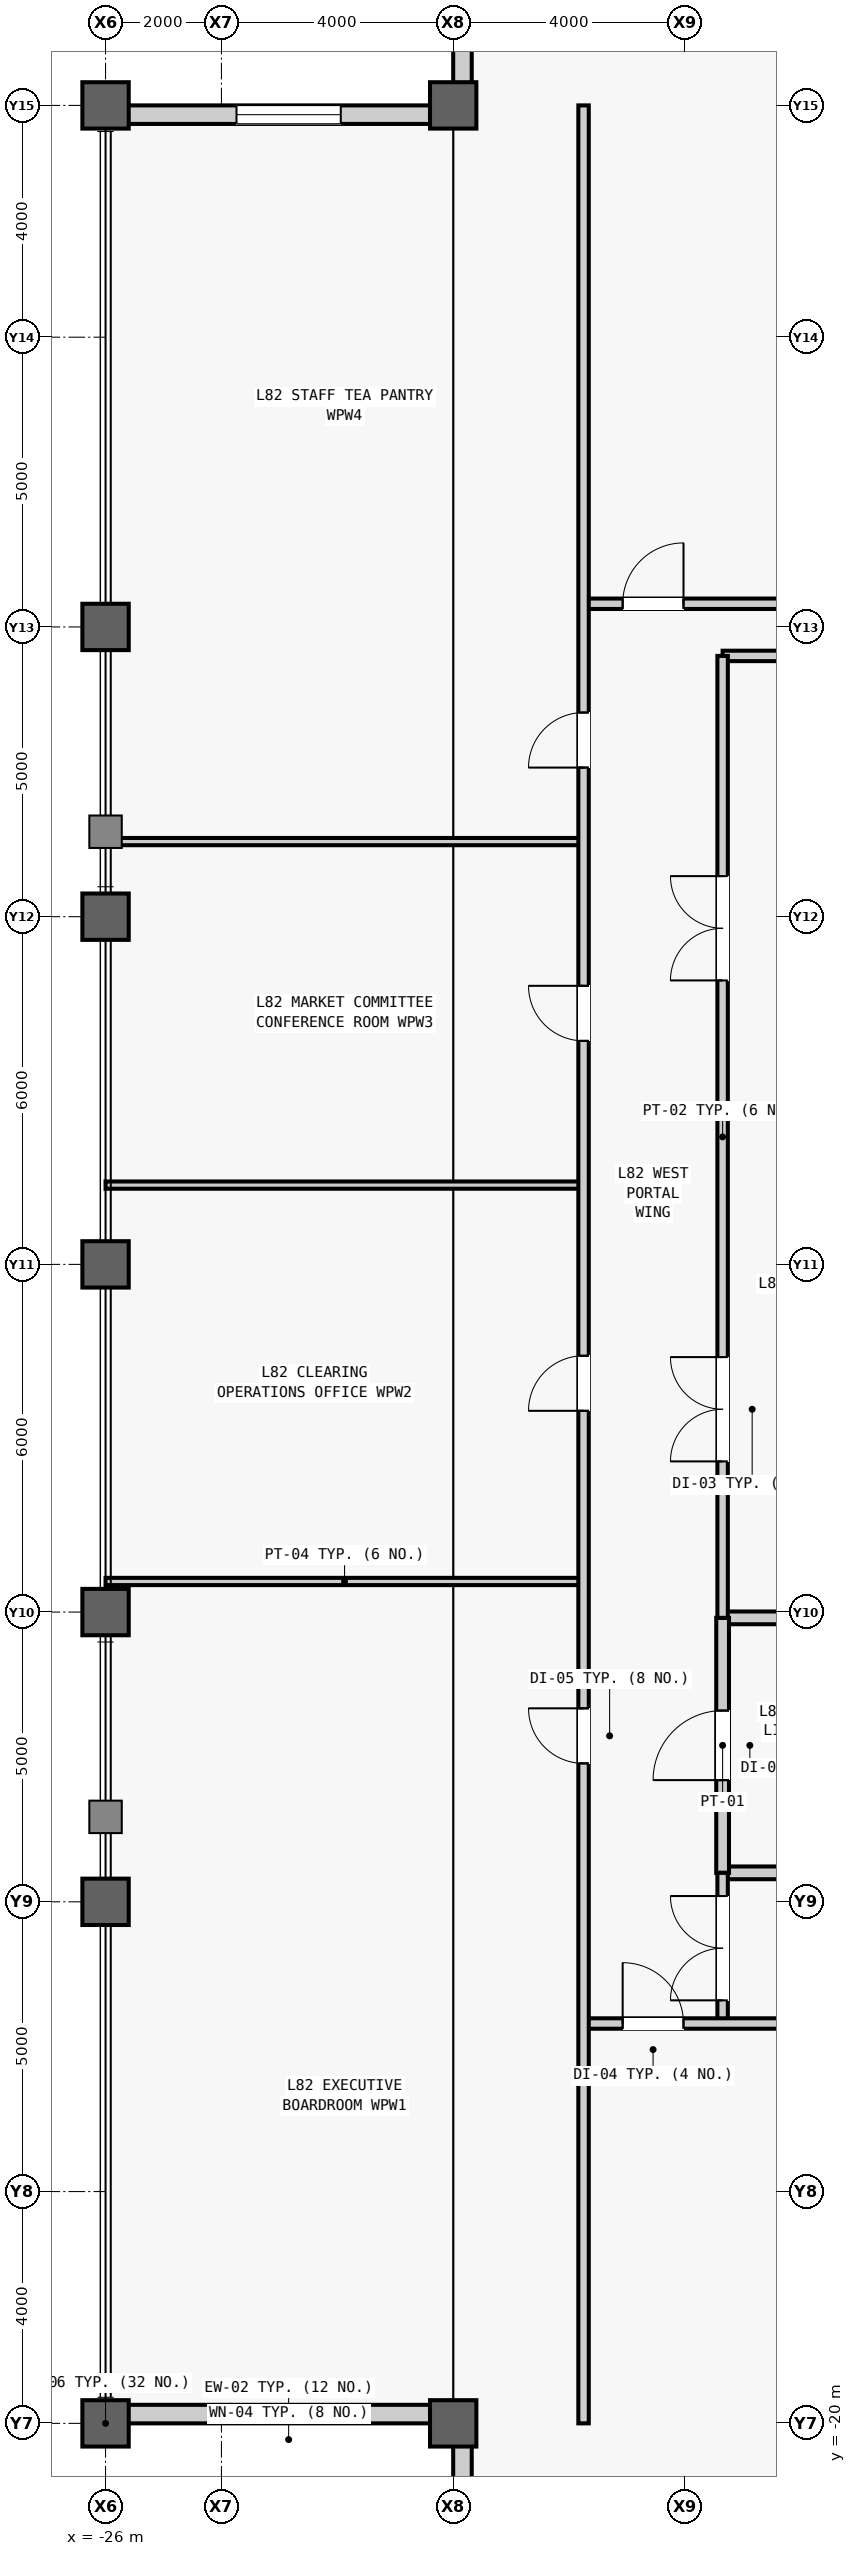
"""IFC4 building model, lengths in metres.
Left out: names, types, materials, properties, quantities, classifications, styles, units other than length and angle.
Written with IfcOpenShell. Run it as: python <this file> out.ifc"""

import sys

from ifc_helpers import new_model, si_unit, direction, frame, frame_2d, origin, origin_2d, place, context, subcontext, project, spatial, rectangle, hollow_rectangle, extrude, source, transform, mapped, element, fill, save


model = new_model("IFC4")
c1 = context("Model", 3, precision=1e-05, world=origin(), true_north=direction((0.0, 1.0)))
c2 = subcontext(c1, "Body", "Model", "MODEL_VIEW")
j1 = project(units=[si_unit("LENGTHUNIT", "METRE"), si_unit("PLANEANGLEUNIT", "RADIAN")], contexts=[c1])
p1 = place(None, origin())
s1 = spatial("IfcSite", under=j1, at=p1, CompositionType="ELEMENT")
p2 = place(p1, origin())
s2 = spatial("IfcBuilding", under=s1, at=p2, CompositionType="ELEMENT")
p3 = place(p2, frame((0.0, 0.0, 346.3)))
s3 = spatial("IfcBuildingStorey", under=s2, at=p3, CompositionType="ELEMENT", Elevation=346.3)
m1 = source(origin(), c2, "Body", "SweptSolid", [
    extrude(hollow_rectangle(XDim=0.8, YDim=0.8, WallThickness=0.045, at=origin_2d()), origin(), (0.0, 0.0, 1.0), 4.0),
])
for number, where, z_axis, x_axis in (
    (1, (-26.0, -20.0, 0.0), (0.0, 0.0, 1.0), (1.0, 0.0, 0.0)),
    (2, (-26.0, -11.0, 0.0), (0.0, 0.0, 1.0), (1.0, 0.0, 0.0)),
    (3, (-26.0, -6.0, 0.0), (0.0, 0.0, 1.0), (1.0, 0.0, 0.0)),
    (4, (-26.0, 0.0, 0.0), (0.0, 0.0, 1.0), (1.0, 0.0, 0.0)),
    (5, (-26.0, 6.0, 0.0), (0.0, 0.0, 1.0), (1.0, 0.0, 0.0)),
    (6, (-26.0, 11.0, 0.0), (0.0, 0.0, 1.0), (1.0, 0.0, 0.0)),
    (7, (-26.0, 20.0, 0.0), (0.0, 0.0, 1.0), (1.0, 0.0, 0.0)),
    (8, (-20.0, -20.0, 0.0), (0.0, 0.0, 1.0), (1.0, 0.0, 0.0)),
    (9, (-20.0, 20.0, 0.0), (0.0, 0.0, 1.0), (1.0, 0.0, 0.0)),
):
    element("IfcColumn", number, at=place(p3, frame(where, z_axis=z_axis, x_axis=x_axis)), inside=s3, PredefinedType="COLUMN", context=c2, shape_type="MappedRepresentation", body=[
        mapped(m1, transform((0.0, 0.0, 0.0), scale=1.0)),
    ])
m2 = source(origin(), c2, "Body", "SweptSolid", [
    extrude(rectangle(XDim=5.68, YDim=0.32, at=frame_2d((2.84, 0.0))), origin(), (0.0, 0.0, 1.0), 3.191),
])
p4 = place(p3, frame((-20.0, -19.84, 0.0), z_axis=(0.0, 0.0, 1.0), x_axis=(-1.0, 0.0, 0.0)))
e10 = element("IfcWall", 10, at=p4, inside=s3, PredefinedType="STANDARD", context=c2, shape_type="MappedRepresentation", body=[
    mapped(m2, transform((0.0, 0.0, 0.0), scale=1.0)),
])
m3 = source(origin(), c2, "Body", "SweptSolid", [
    extrude(rectangle(XDim=1.8, YDim=2.4, at=frame_2d((0.9, 1.2))), frame((0.0, 0.17, 0.0), z_axis=(0.0, -1.0, 0.0), x_axis=(1.0, 0.0, 0.0)), (0.0, 0.0, 1.0), 0.34),
])
p5 = place(p4, frame((1.94, 0.0, 0.5)))
e11 = element("IfcOpeningElement", 11, at=p5, cuts=e10, PredefinedType="OPENING", context=c2, shape_type="MappedRepresentation", body=[
    mapped(m3, transform((0.0, 0.0, 0.0), scale=1.0)),
])
p6 = place(p3, frame((-19.84, -25.68, 0.0), z_axis=(0.0, 0.0, 1.0), x_axis=(0.0, 1.0, 0.0)))
e12 = element("IfcWall", 12, at=p6, inside=s3, PredefinedType="STANDARD", context=c2, shape_type="MappedRepresentation", body=[
    mapped(m2, transform((0.0, 0.0, 0.0), scale=1.0)),
])
p7 = place(p6, frame((1.94, 0.0, 0.5)))
e13 = element("IfcOpeningElement", 13, at=p7, cuts=e12, PredefinedType="OPENING", context=c2, shape_type="MappedRepresentation", body=[
    mapped(m3, transform((0.0, 0.0, 0.0), scale=1.0)),
])
p8 = place(p3, frame((-19.84, 20.0, 0.0), z_axis=(0.0, 0.0, 1.0), x_axis=(0.0, 1.0, 0.0)))
e14 = element("IfcWall", 14, at=p8, inside=s3, PredefinedType="STANDARD", context=c2, shape_type="MappedRepresentation", body=[
    mapped(m2, transform((0.0, 0.0, 0.0), scale=1.0)),
])
p9 = place(p8, frame((1.94, 0.0, 0.5)))
e15 = element("IfcOpeningElement", 15, at=p9, cuts=e14, PredefinedType="OPENING", context=c2, shape_type="MappedRepresentation", body=[
    mapped(m3, transform((0.0, 0.0, 0.0), scale=1.0)),
])
p10 = place(p3, frame((-20.0, 19.84, 0.0), z_axis=(0.0, 0.0, 1.0), x_axis=(-1.0, 0.0, 0.0)))
e16 = element("IfcWall", 16, at=p10, inside=s3, PredefinedType="STANDARD", context=c2, shape_type="MappedRepresentation", body=[
    mapped(m2, transform((0.0, 0.0, 0.0), scale=1.0)),
])
p11 = place(p10, frame((1.94, 0.0, 0.5)))
e17 = element("IfcOpeningElement", 17, at=p11, cuts=e16, PredefinedType="OPENING", context=c2, shape_type="MappedRepresentation", body=[
    mapped(m3, transform((0.0, 0.0, 0.0), scale=1.0)),
])
m4 = source(origin(), c2, "Body", "SweptSolid", [
    extrude(rectangle(XDim=4.05, YDim=0.22, at=frame_2d((2.025, 0.0))), origin(), (0.0, 0.0, 1.0), 3.74),
])
p12 = place(p3, frame((-15.35, -10.5, 0.0), z_axis=(0.0, 0.0, 1.0), x_axis=(1.0, 0.0, 0.0)))
e18 = element("IfcWall", 18, at=p12, inside=s3, PredefinedType="PARTITIONING", context=c2, shape_type="MappedRepresentation", body=[
    mapped(m4, transform((0.0, 0.0, 0.0), scale=1.0)),
])
m5 = source(origin(), c2, "Body", "SweptSolid", [
    extrude(rectangle(XDim=4.05, YDim=0.22, at=frame_2d((2.025, 0.0))), origin(), (0.0, 0.0, 1.0), 3.124),
])
p13 = place(p3, frame((-15.35, -6.1, 0.0), z_axis=(0.0, 0.0, 1.0), x_axis=(1.0, 0.0, 0.0)))
e19 = element("IfcWall", 19, at=p13, inside=s3, PredefinedType="PARTITIONING", context=c2, shape_type="MappedRepresentation", body=[
    mapped(m5, transform((0.0, 0.0, 0.0), scale=1.0)),
])
m6 = source(origin(), c2, "Body", "SweptSolid", [
    extrude(rectangle(XDim=4.4, YDim=0.22, at=frame_2d((2.2, 0.0))), origin(), (0.0, 0.0, 1.0), 3.74),
])
p14 = place(p3, frame((-15.35, -10.5, 0.0), z_axis=(0.0, 0.0, 1.0), x_axis=(0.0, 1.0, 0.0)))
e20 = element("IfcWall", 20, at=p14, inside=s3, PredefinedType="PARTITIONING", context=c2, shape_type="MappedRepresentation", body=[
    mapped(m6, transform((0.0, 0.0, 0.0), scale=1.0)),
])
m7 = source(origin(), c2, "Body", "SweptSolid", [
    extrude(rectangle(XDim=1.2, YDim=2.2, at=frame_2d((0.6, 1.1))), frame((0.0, 0.12, 0.0), z_axis=(0.0, -1.0, 0.0), x_axis=(1.0, 0.0, 0.0)), (0.0, 0.0, 1.0), 0.24),
])
p15 = place(p14, frame((1.6, 0.0, 0.0)))
e21 = element("IfcOpeningElement", 21, at=p15, cuts=e20, PredefinedType="OPENING", context=c2, shape_type="MappedRepresentation", body=[
    mapped(m7, transform((0.0, 0.0, 0.0), scale=1.0)),
])
m8 = source(origin(), c2, "Body", "SweptSolid", [
    extrude(rectangle(XDim=4.05, YDim=0.18, at=frame_2d((2.025, 0.0))), origin(), (0.0, 0.0, 1.0), 3.74),
])
p16 = place(p3, frame((-15.35, 10.5, 0.0), z_axis=(0.0, 0.0, 1.0), x_axis=(1.0, 0.0, 0.0)))
e22 = element("IfcWall", 22, at=p16, inside=s3, PredefinedType="PARTITIONING", context=c2, shape_type="MappedRepresentation", body=[
    mapped(m8, transform((0.0, 0.0, 0.0), scale=1.0)),
])
m9 = source(origin(), c2, "Body", "SweptSolid", [
    extrude(rectangle(XDim=16.6, YDim=0.18, at=frame_2d((8.3, 0.0))), origin(), (0.0, 0.0, 1.0), 3.74),
])
p17 = place(p3, frame((-15.35, -6.1, 0.0), z_axis=(0.0, 0.0, 1.0), x_axis=(0.0, 1.0, 0.0)))
e23 = element("IfcWall", 23, at=p17, inside=s3, PredefinedType="PARTITIONING", context=c2, shape_type="MappedRepresentation", body=[
    mapped(m9, transform((0.0, 0.0, 0.0), scale=1.0)),
])
m10 = source(origin(), c2, "Body", "SweptSolid", [
    extrude(rectangle(XDim=1.8, YDim=2.25, at=frame_2d((0.9, 1.125))), frame((0.0, 0.1, 0.0), z_axis=(0.0, -1.0, 0.0), x_axis=(1.0, 0.0, 0.0)), (0.0, 0.0, 1.0), 0.2),
])
p18 = place(p17, frame((2.7, 0.0, 0.0)))
e24 = element("IfcOpeningElement", 24, at=p18, cuts=e23, PredefinedType="OPENING", context=c2, shape_type="MappedRepresentation", body=[
    mapped(m10, transform((0.0, 0.0, 0.0), scale=1.0)),
])
p19 = place(p17, frame((11.0, 0.0, 0.0)))
e25 = element("IfcOpeningElement", 25, at=p19, cuts=e23, PredefinedType="OPENING", context=c2, shape_type="MappedRepresentation", body=[
    mapped(m10, transform((0.0, 0.0, 0.0), scale=1.0)),
])
m11 = source(origin(), c2, "Body", "SweptSolid", [
    extrude(rectangle(XDim=2.6, YDim=0.18, at=frame_2d((1.3, 0.0))), origin(), (0.0, 0.0, 1.0), 3.74),
])
p20 = place(p3, frame((-15.35, -13.1, 0.0), z_axis=(0.0, 0.0, 1.0), x_axis=(0.0, 1.0, 0.0)))
e26 = element("IfcWall", 26, at=p20, inside=s3, PredefinedType="PARTITIONING", context=c2, shape_type="MappedRepresentation", body=[
    mapped(m11, transform((0.0, 0.0, 0.0), scale=1.0)),
])
p21 = place(p20, frame((0.4, 0.0, 0.0)))
e27 = element("IfcOpeningElement", 27, at=p21, cuts=e26, PredefinedType="OPENING", context=c2, shape_type="MappedRepresentation", body=[
    mapped(m10, transform((0.0, 0.0, 0.0), scale=1.0)),
])
m12 = source(origin(), c2, "Body", "SweptSolid", [
    extrude(rectangle(XDim=22.55, YDim=0.18, at=frame_2d((11.275, 0.0))), origin(), (0.0, 0.0, 1.0), 3.74),
])
p22 = place(p3, frame((-17.75, -13.1, 0.0), z_axis=(0.0, 0.0, 1.0), x_axis=(1.0, 0.0, 0.0)))
e28 = element("IfcWall", 28, at=p22, inside=s3, PredefinedType="PARTITIONING", context=c2, shape_type="MappedRepresentation", body=[
    mapped(m12, transform((0.0, 0.0, 0.0), scale=1.0)),
])
m13 = source(origin(), c2, "Body", "SweptSolid", [
    extrude(rectangle(XDim=1.05, YDim=2.2, at=frame_2d((0.525, 1.1))), frame((0.0, 0.1, 0.0), z_axis=(0.0, -1.0, 0.0), x_axis=(1.0, 0.0, 0.0)), (0.0, 0.0, 1.0), 0.2),
])
p23 = place(p22, frame((0.675, 0.0, 0.0)))
e29 = element("IfcOpeningElement", 29, at=p23, cuts=e28, PredefinedType="OPENING", context=c2, shape_type="MappedRepresentation", body=[
    mapped(m13, transform((0.0, 0.0, 0.0), scale=1.0)),
])
m14 = source(origin(), c2, "Body", "SweptSolid", [
    extrude(rectangle(XDim=12.7, YDim=0.18, at=frame_2d((6.35, 0.0))), origin(), (0.0, 0.0, 1.0), 2.79),
])
p24 = place(p3, frame((-17.75, 11.4, 0.0), z_axis=(0.0, 0.0, 1.0), x_axis=(1.0, 0.0, 0.0)))
e30 = element("IfcWall", 30, at=p24, inside=s3, PredefinedType="PARTITIONING", context=c2, shape_type="MappedRepresentation", body=[
    mapped(m14, transform((0.0, 0.0, 0.0), scale=1.0)),
])
p25 = place(p24, frame((0.675, 0.0, 0.0)))
e31 = element("IfcOpeningElement", 31, at=p25, cuts=e30, PredefinedType="OPENING", context=c2, shape_type="MappedRepresentation", body=[
    mapped(m13, transform((0.0, 0.0, 0.0), scale=1.0)),
])
m15 = source(origin(), c2, "Body", "SweptSolid", [
    extrude(rectangle(XDim=8.25, YDim=0.125, at=frame_2d((4.125, 0.0))), origin(), (0.0, 0.0, 1.0), 3.74),
])
for number, where, z_axis, x_axis in (
    (32, (-26.0, -5.472, 0.0), (0.0, 0.0, 1.0), (1.0, 0.0, 0.0)),
    (33, (-26.0, 1.368, 0.0), (0.0, 0.0, 1.0), (1.0, 0.0, 0.0)),
    (34, (-26.0, 7.296, 0.0), (0.0, 0.0, 1.0), (1.0, 0.0, 0.0)),
):
    element("IfcWall", number, at=place(p3, frame(where, z_axis=z_axis, x_axis=x_axis)), inside=s3, PredefinedType="PARTITIONING", context=c2, shape_type="MappedRepresentation", body=[
        mapped(m15, transform((0.0, 0.0, 0.0), scale=1.0)),
    ])
m16 = source(origin(), c2, "Body", "SweptSolid", [
    extrude(rectangle(XDim=40.0, YDim=0.18, at=frame_2d((20.0, 0.0))), origin(), (0.0, 0.0, 1.0), 3.74),
])
p26 = place(p3, frame((-17.75, -20.0, 0.0), z_axis=(0.0, 0.0, 1.0), x_axis=(0.0, 1.0, 0.0)))
e35 = element("IfcWall", 35, at=p26, inside=s3, PredefinedType="PARTITIONING", context=c2, shape_type="MappedRepresentation", body=[
    mapped(m16, transform((0.0, 0.0, 0.0), scale=1.0)),
])
m17 = source(origin(), c2, "Body", "SweptSolid", [
    extrude(rectangle(XDim=0.95, YDim=2.15, at=frame_2d((0.475, 1.075))), frame((0.0, 0.1, 0.0), z_axis=(0.0, -1.0, 0.0), x_axis=(1.0, 0.0, 0.0)), (0.0, 0.0, 1.0), 0.2),
])
p27 = place(p26, frame((11.389, 0.0, 0.0)))
e36 = element("IfcOpeningElement", 36, at=p27, cuts=e35, PredefinedType="OPENING", context=c2, shape_type="MappedRepresentation", body=[
    mapped(m17, transform((0.0, 0.0, 0.0), scale=1.0)),
])
p28 = place(p26, frame((17.473, 0.0, 0.0)))
e37 = element("IfcOpeningElement", 37, at=p28, cuts=e35, PredefinedType="OPENING", context=c2, shape_type="MappedRepresentation", body=[
    mapped(m17, transform((0.0, 0.0, 0.0), scale=1.0)),
])
p29 = place(p26, frame((23.857, 0.0, 0.0)))
e38 = element("IfcOpeningElement", 38, at=p29, cuts=e35, PredefinedType="OPENING", context=c2, shape_type="MappedRepresentation", body=[
    mapped(m17, transform((0.0, 0.0, 0.0), scale=1.0)),
])
p30 = place(p26, frame((28.573, 0.0, 0.0)))
e39 = element("IfcOpeningElement", 39, at=p30, cuts=e35, PredefinedType="OPENING", context=c2, shape_type="MappedRepresentation", body=[
    mapped(m17, transform((0.0, 0.0, 0.0), scale=1.0)),
])
m18 = source(origin(), c2, "Body", "SweptSolid", [
    extrude(rectangle(XDim=1.8, YDim=2.4, at=frame_2d((0.9, 1.2))), frame((0.0, 0.03, 0.0), z_axis=(0.0, -1.0, 0.0), x_axis=(1.0, 0.0, 0.0)), (0.0, 0.0, 1.0), 0.06),
])
p31 = place(p5, origin())
e40 = element("IfcWindow", 40, at=p31, inside=s3, PartitioningType="SINGLE_PANEL", PredefinedType="WINDOW", context=c2, shape_type="MappedRepresentation", body=[
    mapped(m18, transform((0.0, 0.0, 0.0), scale=1.0)),
])
fill(e11, e40)
p32 = place(p11, origin())
e41 = element("IfcWindow", 41, at=p32, inside=s3, PartitioningType="SINGLE_PANEL", PredefinedType="WINDOW", context=c2, shape_type="MappedRepresentation", body=[
    mapped(m18, transform((0.0, 0.0, 0.0), scale=1.0)),
])
fill(e17, e41)
m19 = source(origin(), c2, "Body", "SweptSolid", [
    extrude(rectangle(XDim=1.2, YDim=2.2, at=frame_2d((0.6, 1.1))), frame((0.0, 0.025, 0.0), z_axis=(0.0, -1.0, 0.0), x_axis=(1.0, 0.0, 0.0)), (0.0, 0.0, 1.0), 0.05),
])
p33 = place(p15, origin())
e42 = element("IfcDoor", 42, at=p33, inside=s3, OperationType="SINGLE_SWING_LEFT", PredefinedType="DOOR", context=c2, shape_type="MappedRepresentation", body=[
    mapped(m19, transform((0.0, 0.0, 0.0), scale=1.0)),
])
fill(e21, e42)
m20 = source(origin(), c2, "Body", "SweptSolid", [
    extrude(rectangle(XDim=1.8, YDim=2.25, at=frame_2d((0.9, 1.125))), frame((0.0, 0.025, 0.0), z_axis=(0.0, -1.0, 0.0), x_axis=(1.0, 0.0, 0.0)), (0.0, 0.0, 1.0), 0.05),
])
p34 = place(p18, origin())
e43 = element("IfcDoor", 43, at=p34, inside=s3, OperationType="SINGLE_SWING_LEFT", PredefinedType="DOOR", context=c2, shape_type="MappedRepresentation", body=[
    mapped(m20, transform((0.0, 0.0, 0.0), scale=1.0)),
])
fill(e24, e43)
p35 = place(p19, origin())
e44 = element("IfcDoor", 44, at=p35, inside=s3, OperationType="SINGLE_SWING_RIGHT", PredefinedType="DOOR", context=c2, shape_type="MappedRepresentation", body=[
    mapped(m20, transform((0.0, 0.0, 0.0), scale=1.0)),
])
fill(e25, e44)
p36 = place(p21, origin())
e45 = element("IfcDoor", 45, at=p36, inside=s3, OperationType="DOUBLE_DOOR_SINGLE_SWING", PredefinedType="DOOR", context=c2, shape_type="MappedRepresentation", body=[
    mapped(m20, transform((0.0, 0.0, 0.0), scale=1.0)),
])
fill(e27, e45)
m21 = source(origin(), c2, "Body", "SweptSolid", [
    extrude(rectangle(XDim=1.05, YDim=2.2, at=frame_2d((0.525, 1.1))), frame((0.0, 0.025, 0.0), z_axis=(0.0, -1.0, 0.0), x_axis=(1.0, 0.0, 0.0)), (0.0, 0.0, 1.0), 0.05),
])
p37 = place(p23, origin())
e46 = element("IfcDoor", 46, at=p37, inside=s3, OperationType="SINGLE_SWING_LEFT", PredefinedType="DOOR", context=c2, shape_type="MappedRepresentation", body=[
    mapped(m21, transform((0.0, 0.0, 0.0), scale=1.0)),
])
fill(e29, e46)
p38 = place(p25, origin())
e47 = element("IfcDoor", 47, at=p38, inside=s3, OperationType="SINGLE_SWING_RIGHT", PredefinedType="DOOR", context=c2, shape_type="MappedRepresentation", body=[
    mapped(m21, transform((0.0, 0.0, 0.0), scale=1.0)),
])
fill(e31, e47)
m22 = source(origin(), c2, "Body", "SweptSolid", [
    extrude(rectangle(XDim=0.95, YDim=2.15, at=frame_2d((0.475, 1.075))), frame((0.0, 0.025, 0.0), z_axis=(0.0, -1.0, 0.0), x_axis=(1.0, 0.0, 0.0)), (0.0, 0.0, 1.0), 0.05),
])
p39 = place(p27, origin())
e48 = element("IfcDoor", 48, at=p39, inside=s3, OperationType="SINGLE_SWING_RIGHT", PredefinedType="DOOR", context=c2, shape_type="MappedRepresentation", body=[
    mapped(m22, transform((0.0, 0.0, 0.0), scale=1.0)),
])
fill(e36, e48)
p40 = place(p28, origin())
e49 = element("IfcDoor", 49, at=p40, inside=s3, OperationType="SINGLE_SWING_LEFT", PredefinedType="DOOR", context=c2, shape_type="MappedRepresentation", body=[
    mapped(m22, transform((0.0, 0.0, 0.0), scale=1.0)),
])
fill(e37, e49)
p41 = place(p29, origin())
e50 = element("IfcDoor", 50, at=p41, inside=s3, OperationType="SINGLE_SWING_RIGHT", PredefinedType="DOOR", context=c2, shape_type="MappedRepresentation", body=[
    mapped(m22, transform((0.0, 0.0, 0.0), scale=1.0)),
])
fill(e38, e50)
p42 = place(p30, origin())
e51 = element("IfcDoor", 51, at=p42, inside=s3, OperationType="SINGLE_SWING_LEFT", PredefinedType="DOOR", context=c2, shape_type="MappedRepresentation", body=[
    mapped(m22, transform((0.0, 0.0, 0.0), scale=1.0)),
])
fill(e39, e51)
save(model, sys.argv[1])
